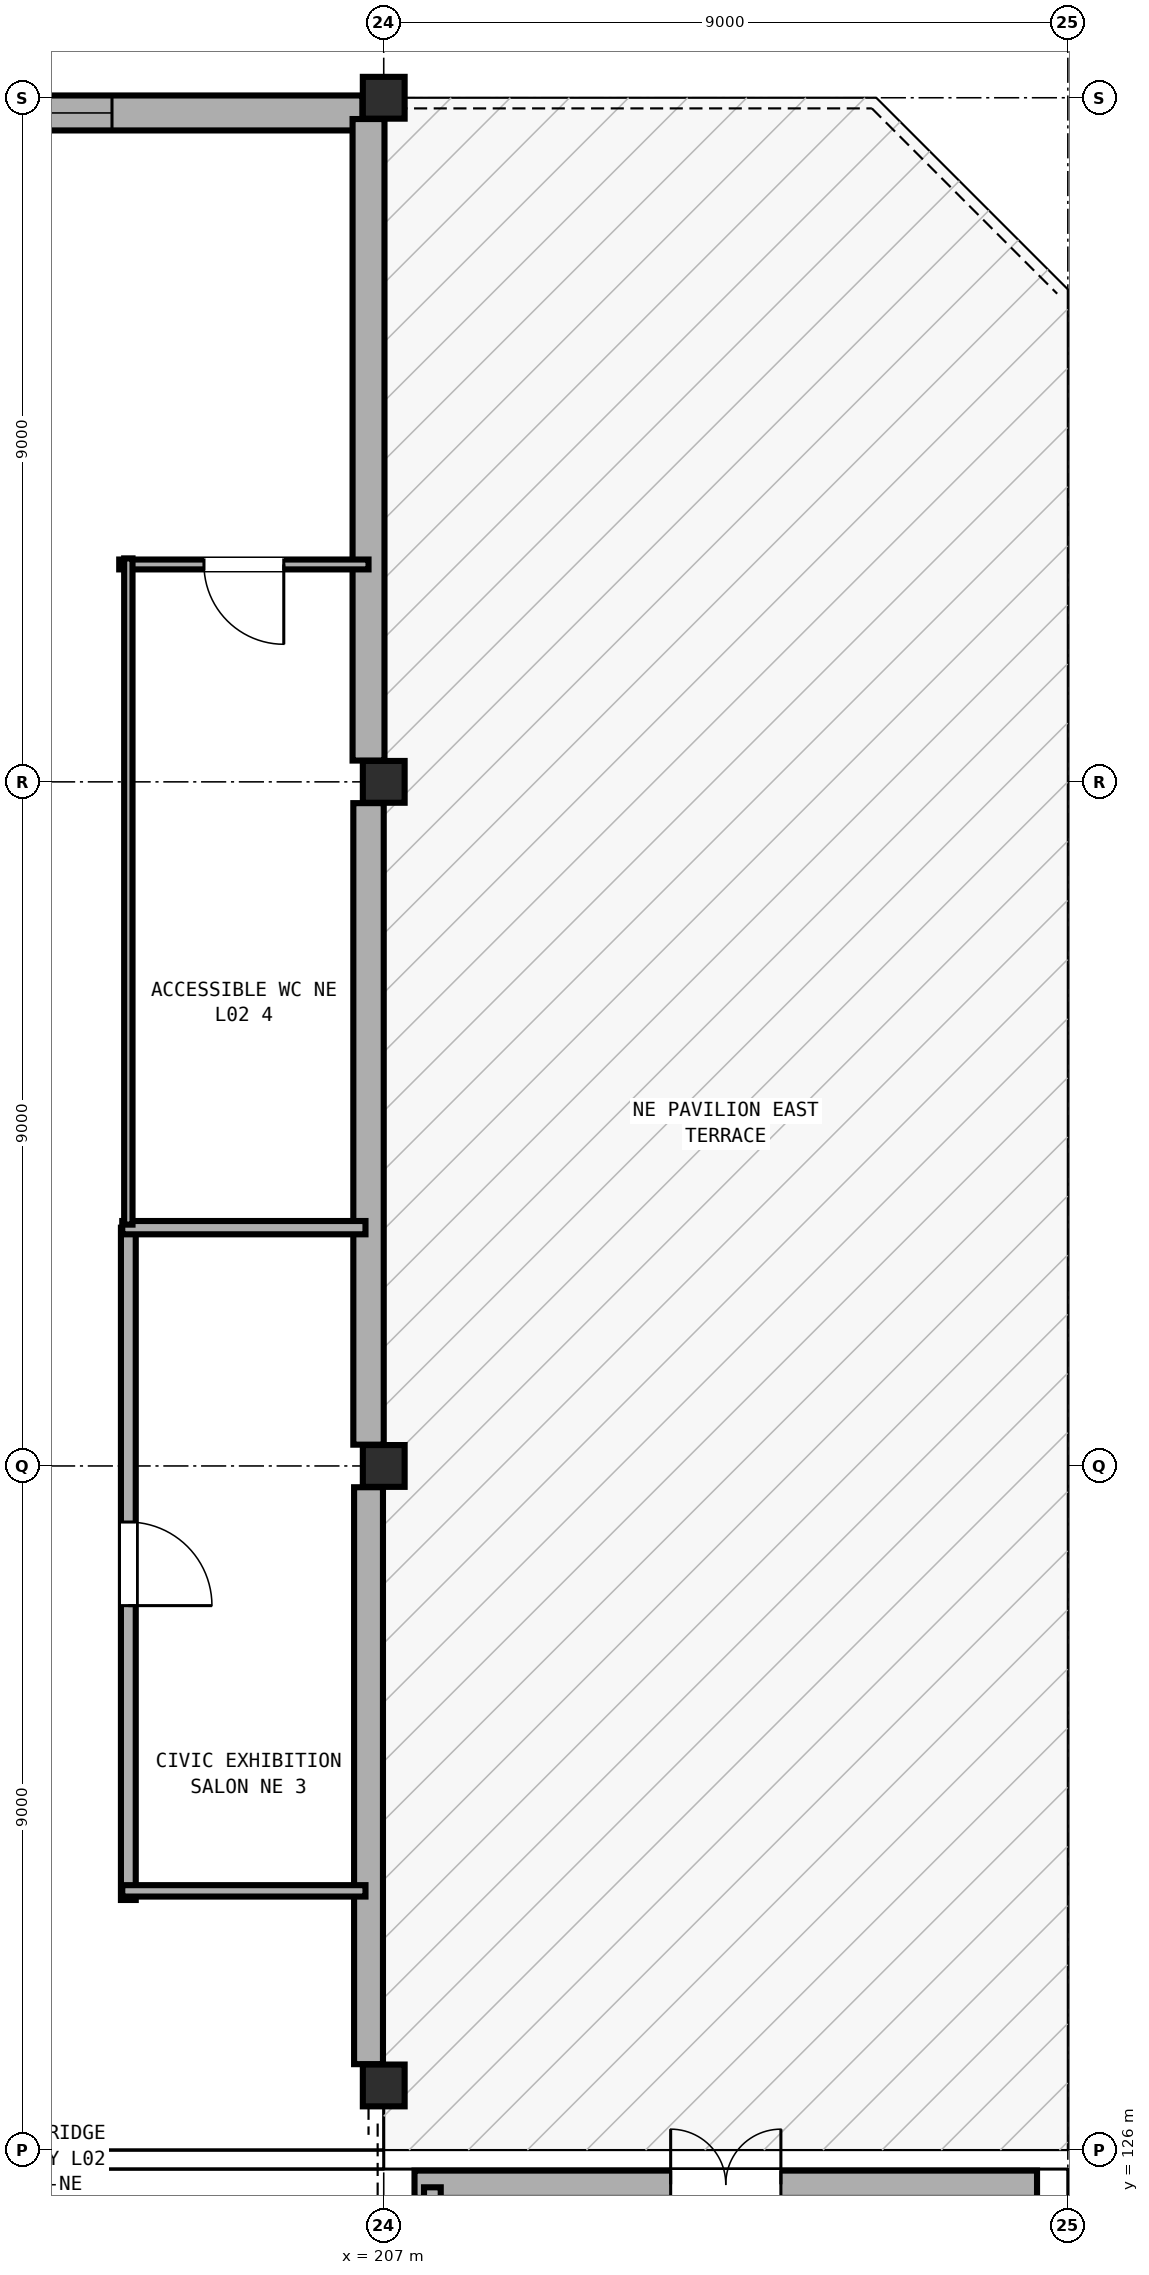
"""IFC4 building model, lengths in metres.
Left out: names, types, materials, properties, quantities, classifications, styles, units other than length and angle.
Written with IfcOpenShell. Run it as: python <this file> out.ifc"""

import sys

from ifc_helpers import new_model, si_unit, direction, frame, frame_2d, origin, origin_2d, place, context, subcontext, project, spatial, rectangle, extrude, element, fill, save


model = new_model("IFC4")
c1 = context("Model", 3, precision=1e-05, world=origin(), true_north=direction((0.0, 1.0)))
c2 = subcontext(c1, "Body", "Model", "MODEL_VIEW")
j1 = project(units=[si_unit("LENGTHUNIT", "METRE"), si_unit("PLANEANGLEUNIT", "RADIAN")], contexts=[c1])
p1 = place(None, origin())
s1 = spatial("IfcSite", under=j1, at=p1, CompositionType="ELEMENT")
p2 = place(p1, origin())
s2 = spatial("IfcBuilding", under=s1, at=p2, CompositionType="ELEMENT")
p3 = place(p2, frame((0.0, 0.0, 9.6)))
s3 = spatial("IfcBuildingStorey", under=s2, at=p3, CompositionType="ELEMENT", Elevation=9.6)
for number, where, z_axis, x_axis in (
    (1, (207.0, 126.85, 0.0), (0.0, 0.0, 1.0), (1.0, 0.0, 0.0)),
    (2, (207.0, 135.0, 0.0), (0.0, 0.0, 1.0), (1.0, 0.0, 0.0)),
    (3, (207.0, 144.0, 0.0), (0.0, 0.0, 1.0), (1.0, 0.0, 0.0)),
    (4, (207.0, 153.0, 0.0), (0.0, 0.0, 1.0), (1.0, 0.0, 0.0)),
):
    element("IfcColumn", number, at=place(p3, frame(where, z_axis=z_axis, x_axis=x_axis)), inside=s3, PredefinedType="COLUMN", context=c2, shape_type="SweptSolid", body=[
        extrude(rectangle(XDim=0.55, YDim=0.55, at=origin_2d()), origin(), (0.0, 0.0, 1.0), 4.8),
    ])
p4 = place(p3, frame((207.405, 125.55, 0.0), z_axis=(0.0, 0.0, 1.0), x_axis=(1.0, 0.0, 0.0)))
e5 = element("IfcWall", 5, at=p4, inside=s3, PredefinedType="SOLIDWALL", context=c2, shape_type="SweptSolid", body=[
    extrude(rectangle(XDim=8.19, YDim=0.36, at=frame_2d((4.095, 0.0))), origin(), (0.0, 0.0, 1.0), 3.58),
])
p5 = place(p4, frame((3.37, 0.0, 0.0)))
e6 = element("IfcOpeningElement", 6, at=p5, cuts=e5, PredefinedType="OPENING", context=c2, shape_type="SweptSolid", body=[
    extrude(rectangle(XDim=1.45, YDim=2.15, at=frame_2d((0.725, 1.075))), frame((0.0, 0.19, 0.0), z_axis=(0.0, -1.0, 0.0), x_axis=(1.0, 0.0, 0.0)), (0.0, 0.0, 1.0), 0.38),
])
p6 = place(p3, frame((198.28, 152.8, 0.0), z_axis=(0.0, 0.0, 1.0), x_axis=(1.0, 0.0, 0.0)))
e7 = element("IfcWall", 7, at=p6, inside=s3, PredefinedType="SOLIDWALL", context=c2, shape_type="SweptSolid", body=[
    extrude(rectangle(XDim=8.44, YDim=0.46, at=frame_2d((4.22, 0.0))), origin(), (0.0, 0.0, 1.0), 3.58),
])
p7 = place(p6, frame((3.295, 0.0, 0.9)))
e8 = element("IfcOpeningElement", 8, at=p7, cuts=e7, PredefinedType="OPENING", context=c2, shape_type="SweptSolid", body=[
    extrude(rectangle(XDim=1.85, YDim=1.95, at=frame_2d((0.925, 0.975))), frame((0.0, 0.24, 0.0), z_axis=(0.0, -1.0, 0.0), x_axis=(1.0, 0.0, 0.0)), (0.0, 0.0, 1.0), 0.48),
])
p8 = place(p3, frame((206.8, 152.72, 0.0), z_axis=(0.0, 0.0, 1.0), x_axis=(0.0, -1.0, 0.0)))
e9 = element("IfcWall", 9, at=p8, inside=s3, PredefinedType="SOLIDWALL", context=c2, shape_type="SweptSolid", body=[
    extrude(rectangle(XDim=8.44, YDim=0.42, at=frame_2d((4.22, 0.0))), origin(), (0.0, 0.0, 1.0), 3.58),
])
p9 = place(p3, frame((206.8, 143.72, 0.0), z_axis=(0.0, 0.0, 1.0), x_axis=(0.0, -1.0, 0.0)))
e10 = element("IfcWall", 10, at=p9, inside=s3, PredefinedType="SOLIDWALL", context=c2, shape_type="SweptSolid", body=[
    extrude(rectangle(XDim=8.44, YDim=0.4, at=frame_2d((4.22, 0.0))), origin(), (0.0, 0.0, 1.0), 3.58),
])
p10 = place(p3, frame((206.8, 134.72, 0.0), z_axis=(0.0, 0.0, 1.0), x_axis=(0.0, -1.0, 0.0)))
e11 = element("IfcWall", 11, at=p10, inside=s3, PredefinedType="SOLIDWALL", context=c2, shape_type="SweptSolid", body=[
    extrude(rectangle(XDim=7.59, YDim=0.38, at=frame_2d((3.795, 0.0))), origin(), (0.0, 0.0, 1.0), 3.58),
])
p11 = place(p3, frame((207.64, 122.5, 0.0), z_axis=(0.0, 0.0, 1.0), x_axis=(0.0, 1.0, 0.0)))
e12 = element("IfcWall", 12, at=p11, inside=s3, PredefinedType="PARTITIONING", context=c2, shape_type="SweptSolid", body=[
    extrude(rectangle(XDim=3.01, YDim=0.22, at=frame_2d((1.505, 0.0))), origin(), (0.0, 0.0, 1.0), 3.56),
])
p12 = place(p3, frame((203.64, 138.135, 0.0), z_axis=(0.0, 0.0, 1.0), x_axis=(0.0, -1.0, 0.0)))
e13 = element("IfcWall", 13, at=p12, inside=s3, PredefinedType="PARTITIONING", context=c2, shape_type="SweptSolid", body=[
    extrude(rectangle(XDim=8.845, YDim=0.195, at=frame_2d((4.422, 0.0))), origin(), (0.0, 0.0, 1.0), 3.56),
])
p13 = place(p12, frame((3.873, 0.0, 0.0)))
e14 = element("IfcOpeningElement", 14, at=p13, cuts=e13, PredefinedType="OPENING", context=c2, shape_type="SweptSolid", body=[
    extrude(rectangle(XDim=1.1, YDim=2.1, at=frame_2d((0.55, 1.05))), frame((0.0, 0.107, 0.0), z_axis=(0.0, -1.0, 0.0), x_axis=(1.0, 0.0, 0.0)), (0.0, 0.0, 1.0), 0.215),
])
p14 = place(p3, frame((203.56, 138.135, 0.0), z_axis=(0.0, 0.0, 1.0), x_axis=(1.0, 0.0, 0.0)))
e15 = element("IfcWall", 15, at=p14, inside=s3, PredefinedType="PARTITIONING", context=c2, shape_type="SweptSolid", body=[
    extrude(rectangle(XDim=3.2, YDim=0.175, at=frame_2d((1.6, 0.0))), origin(), (0.0, 0.0, 1.0), 3.56),
])
p15 = place(p3, frame((206.76, 129.41, 0.0), z_axis=(0.0, 0.0, 1.0), x_axis=(-1.0, 0.0, 0.0)))
e16 = element("IfcWall", 16, at=p15, inside=s3, PredefinedType="PARTITIONING", context=c2, shape_type="SweptSolid", body=[
    extrude(rectangle(XDim=3.2, YDim=0.15, at=frame_2d((1.6, 0.0))), origin(), (0.0, 0.0, 1.0), 3.56),
])
p16 = place(p3, frame((206.8, 146.86, 0.0), z_axis=(0.0, 0.0, 1.0), x_axis=(-1.0, 0.0, 0.0)))
e17 = element("IfcWall", 17, at=p16, inside=s3, PredefinedType="PARTITIONING", context=c2, shape_type="SweptSolid", body=[
    extrude(rectangle(XDim=3.28, YDim=0.13, at=frame_2d((1.64, 0.0))), origin(), (0.0, 0.0, 1.0), 3.56),
])
p17 = place(p16, frame((1.115, 0.0, 0.0)))
e18 = element("IfcOpeningElement", 18, at=p17, cuts=e17, PredefinedType="OPENING", context=c2, shape_type="SweptSolid", body=[
    extrude(rectangle(XDim=1.05, YDim=2.1, at=frame_2d((0.525, 1.05))), frame((0.0, 0.075, 0.0), z_axis=(0.0, -1.0, 0.0), x_axis=(1.0, 0.0, 0.0)), (0.0, 0.0, 1.0), 0.15),
])
p18 = place(p3, frame((203.64, 138.175, 0.0), z_axis=(0.0, 0.0, 1.0), x_axis=(0.0, 1.0, 0.0)))
e19 = element("IfcWall", 19, at=p18, inside=s3, PredefinedType="PARTITIONING", context=c2, shape_type="SweptSolid", body=[
    extrude(rectangle(XDim=8.765, YDim=0.11, at=frame_2d((4.382, 0.0))), origin(), (0.0, 0.0, 1.0), 3.56),
])
p19 = place(p7, origin())
e20 = element("IfcWindow", 20, at=p19, inside=s3, PartitioningType="DOUBLE_PANEL_VERTICAL", PredefinedType="WINDOW", context=c2, shape_type="SweptSolid", body=[
    extrude(rectangle(XDim=1.85, YDim=1.95, at=frame_2d((0.925, 0.975))), frame((0.0, 0.03, 0.0), z_axis=(0.0, -1.0, 0.0), x_axis=(1.0, 0.0, 0.0)), (0.0, 0.0, 1.0), 0.06),
])
fill(e8, e20)
p20 = place(p5, origin())
e21 = element("IfcDoor", 21, at=p20, inside=s3, OperationType="DOUBLE_DOOR_SINGLE_SWING", PredefinedType="DOOR", context=c2, shape_type="SweptSolid", body=[
    extrude(rectangle(XDim=1.45, YDim=2.15, at=frame_2d((0.725, 1.075))), frame((0.0, 0.025, 0.0), z_axis=(0.0, -1.0, 0.0), x_axis=(1.0, 0.0, 0.0)), (0.0, 0.0, 1.0), 0.05),
])
fill(e6, e21)
p21 = place(p13, origin())
e22 = element("IfcDoor", 22, at=p21, inside=s3, OperationType="SINGLE_SWING_RIGHT", PredefinedType="DOOR", context=c2, shape_type="SweptSolid", body=[
    extrude(rectangle(XDim=1.1, YDim=2.1, at=frame_2d((0.55, 1.05))), frame((0.0, 0.025, 0.0), z_axis=(0.0, -1.0, 0.0), x_axis=(1.0, 0.0, 0.0)), (0.0, 0.0, 1.0), 0.05),
])
fill(e14, e22)
p22 = place(p17, origin())
e23 = element("IfcDoor", 23, at=p22, inside=s3, OperationType="SINGLE_SWING_LEFT", PredefinedType="DOOR", context=c2, shape_type="SweptSolid", body=[
    extrude(rectangle(XDim=1.05, YDim=2.1, at=frame_2d((0.525, 1.05))), frame((0.0, 0.025, 0.0), z_axis=(0.0, -1.0, 0.0), x_axis=(1.0, 0.0, 0.0)), (0.0, 0.0, 1.0), 0.05),
])
fill(e18, e23)
save(model, sys.argv[1])
